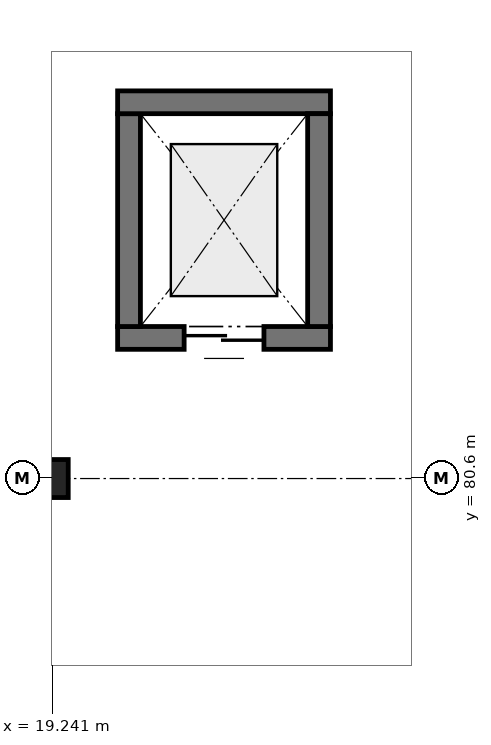
"""IFC4 building model, lengths in metres.
Left out: names, types, materials, properties, quantities, classifications, styles, units other than length and angle.
Written with IfcOpenShell. Run it as: python <this file> out.ifc"""

import sys

from ifc_helpers import new_model, si_unit, direction, frame, frame_2d, origin, origin_2d, place, context, subcontext, project, spatial, rectangle, extrude, element, fill, save


model = new_model("IFC4")
c1 = context("Model", 3, precision=1e-05, world=origin(), true_north=direction((0.0, 1.0)))
c2 = subcontext(c1, "Body", "Model", "MODEL_VIEW")
j1 = project(units=[si_unit("LENGTHUNIT", "METRE"), si_unit("PLANEANGLEUNIT", "RADIAN")], contexts=[c1])
p1 = place(None, origin())
s1 = spatial("IfcSite", under=j1, at=p1, CompositionType="ELEMENT")
p2 = place(p1, origin())
s2 = spatial("IfcBuilding", under=s1, at=p2, CompositionType="ELEMENT")
p3 = place(p2, frame((0.0, 0.0, 13.2)))
s3 = spatial("IfcBuildingStorey", under=s2, at=p3, CompositionType="ELEMENT", Elevation=13.2)
p4 = place(p3, frame((19.2, 80.6, 0.0), z_axis=(0.0, 0.0, 1.0), x_axis=(1.0, 0.0, 0.0)))
e1 = element("IfcColumn", 1, at=p4, inside=s3, PredefinedType="COLUMN", context=c2, shape_type="SweptSolid", body=[
    extrude(rectangle(XDim=0.5, YDim=0.5, at=origin_2d()), origin(), (0.0, 0.0, 1.0), 3.71),
])
p5 = place(p3, frame((22.9, 82.45, 0.0), z_axis=(0.0, 0.0, 1.0), x_axis=(-1.0, 0.0, 0.0)))
e2 = element("IfcWall", 2, at=p5, inside=s3, PredefinedType="SOLIDWALL", context=c2, shape_type="SweptSolid", body=[
    extrude(rectangle(XDim=2.8, YDim=0.3, at=frame_2d((1.4, 0.0))), origin(), (0.0, 0.0, 1.0), 3.6),
])
p6 = place(p5, frame((0.875, 0.0, 0.0)))
e3 = element("IfcOpeningElement", 3, at=p6, cuts=e2, PredefinedType="OPENING", context=c2, shape_type="SweptSolid", body=[
    extrude(rectangle(XDim=1.05, YDim=2.15, at=frame_2d((0.525, 1.075))), frame((0.0, 0.17, 0.0), z_axis=(0.0, -1.0, 0.0), x_axis=(1.0, 0.0, 0.0)), (0.0, 0.0, 1.0), 0.34),
])
for number, where, z_axis, x_axis in (
    (4, (20.25, 82.6, 0.0), (0.0, 0.0, 1.0), (0.0, 1.0, 0.0)),
    (5, (20.1, 85.55, 0.0), (0.0, 0.0, 1.0), (1.0, 0.0, 0.0)),
    (6, (22.75, 85.4, 0.0), (0.0, 0.0, 1.0), (0.0, -1.0, 0.0)),
):
    element("IfcWall", number, at=place(p3, frame(where, z_axis=z_axis, x_axis=x_axis)), inside=s3, PredefinedType="SOLIDWALL", context=c2, shape_type="SweptSolid", body=[
        extrude(rectangle(XDim=2.8, YDim=0.3, at=frame_2d((1.4, 0.0))), origin(), (0.0, 0.0, 1.0), 3.6),
    ])
p7 = place(p6, origin())
e7 = element("IfcDoor", 7, at=p7, inside=s3, OperationType="DOUBLE_DOOR_SLIDING", PredefinedType="DOOR", context=c2, shape_type="SweptSolid", body=[
    extrude(rectangle(XDim=1.05, YDim=2.15, at=frame_2d((0.525, 1.075))), frame((0.0, 0.025, 0.0), z_axis=(0.0, -1.0, 0.0), x_axis=(1.0, 0.0, 0.0)), (0.0, 0.0, 1.0), 0.05),
])
fill(e3, e7)
save(model, sys.argv[1])
